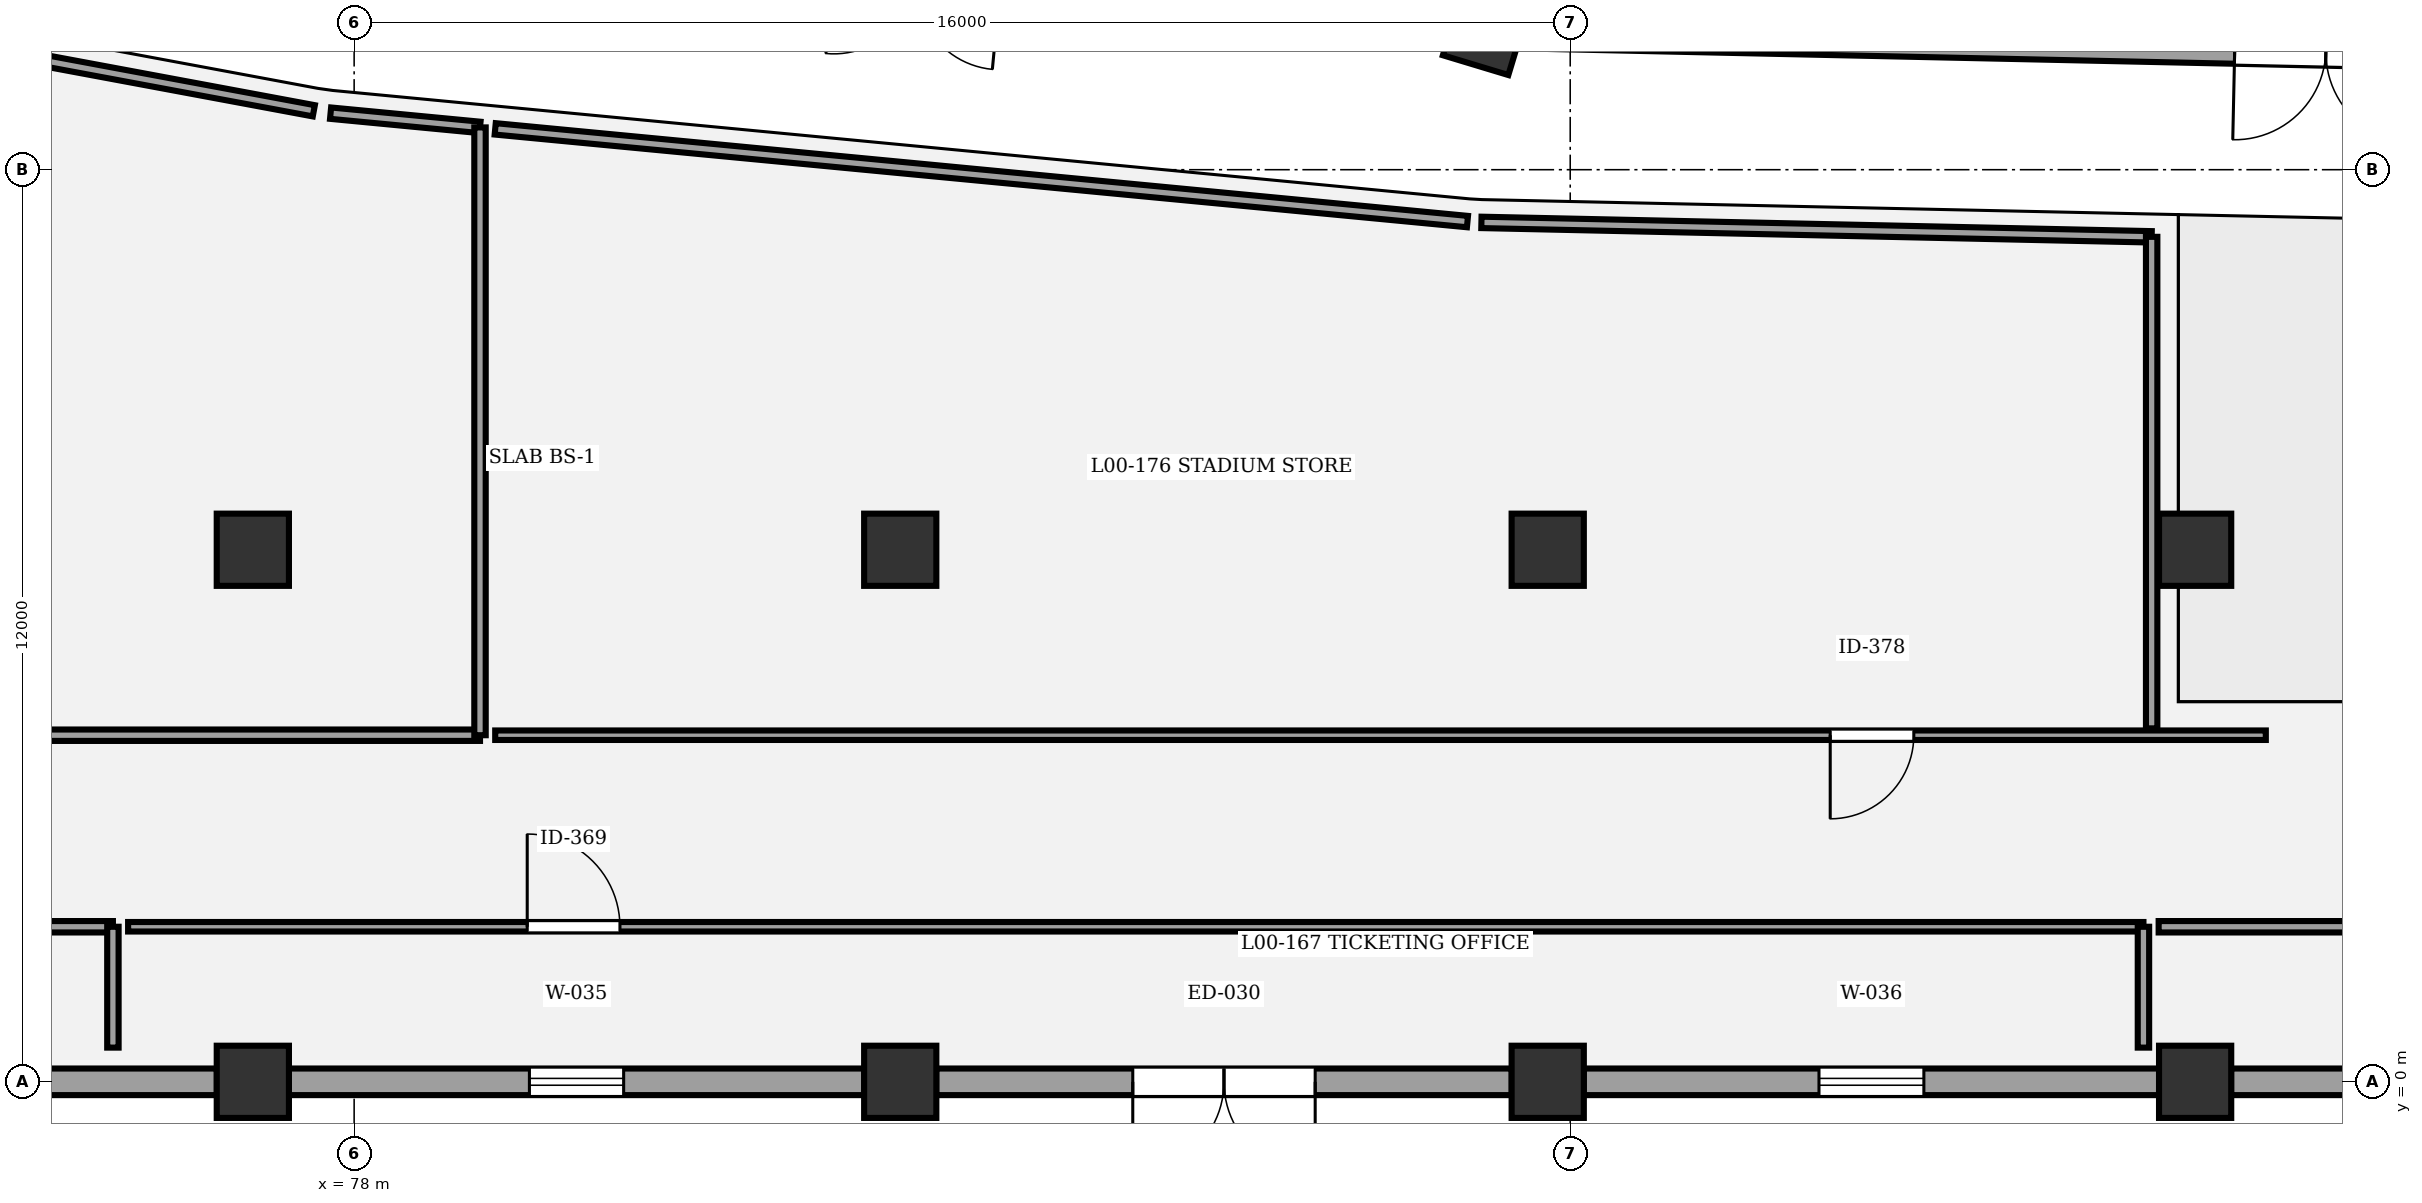
"""IFC4 building model, lengths in metres.
Left out: names, types, materials, properties, quantities, classifications, styles, units other than length and angle.
Written with IfcOpenShell. Run it as: python <this file> out.ifc"""

import sys

from ifc_helpers import new_model, si_unit, direction, frame, frame_2d, origin, origin_2d, place, context, subcontext, project, spatial, rectangle, circle, extrude, element, fill, save


model = new_model("IFC4")
c1 = context("Model", 3, precision=1e-05, world=origin(), true_north=direction((0.0, 1.0)))
c2 = subcontext(c1, "Body", "Model", "MODEL_VIEW")
j1 = project(units=[si_unit("LENGTHUNIT", "METRE"), si_unit("PLANEANGLEUNIT", "RADIAN")], contexts=[c1])
p1 = place(None, origin())
s1 = spatial("IfcSite", under=j1, at=p1, CompositionType="ELEMENT")
p2 = place(p1, origin())
s2 = spatial("IfcBuilding", under=s1, at=p2, CompositionType="ELEMENT")
p3 = place(p2, origin())
s3 = spatial("IfcBuildingStorey", under=s2, at=p3, CompositionType="ELEMENT", Elevation=0.0)
p4 = place(p3, frame((92.885, 13.806, 0.0), z_axis=(0.0, 0.0, 1.0), x_axis=(-0.289198876314, -0.957269037387, 0.0)))
e1 = element("IfcColumn", 1, at=p4, inside=s3, PredefinedType="COLUMN", context=c2, shape_type="SweptSolid", body=[
    extrude(rectangle(XDim=0.9, YDim=0.9, at=origin_2d()), origin(), (0.0, 0.0, 1.0), 5.4),
])
for number, where, z_axis, x_axis in (
    (2, (76.667, 0.0, 0.0), (0.0, 0.0, 1.0), (1.0, 0.0, 0.0)),
    (3, (76.667, 7.0, 0.0), (0.0, 0.0, 1.0), (1.0, 0.0, 0.0)),
    (4, (85.185, 0.0, 0.0), (0.0, 0.0, 1.0), (1.0, 0.0, 0.0)),
    (5, (85.185, 7.0, 0.0), (0.0, 0.0, 1.0), (1.0, 0.0, 0.0)),
    (6, (93.704, 0.0, 0.0), (0.0, 0.0, 1.0), (1.0, 0.0, 0.0)),
    (7, (93.704, 7.0, 0.0), (0.0, 0.0, 1.0), (1.0, 0.0, 0.0)),
    (8, (102.222, 0.0, 0.0), (0.0, 0.0, 1.0), (1.0, 0.0, 0.0)),
    (9, (102.222, 7.0, 0.0), (0.0, 0.0, 1.0), (1.0, 0.0, 0.0)),
):
    element("IfcColumn", number, at=place(p3, frame(where, z_axis=z_axis, x_axis=x_axis)), inside=s3, PredefinedType="COLUMN", context=c2, shape_type="SweptSolid", body=[
        extrude(circle(Radius=0.475, at=origin_2d()), origin(), (0.0, 0.0, 1.0), 5.4),
    ])
p5 = place(p3, frame((114.552, 13.34, 0.0), z_axis=(0.0, 0.0, 1.0), x_axis=(-0.999768115817, 0.021534033422, 0.0)))
e10 = element("IfcWall", 10, at=p5, inside=s3, PredefinedType="STANDARD", context=c2, shape_type="SweptSolid", body=[
    extrude(rectangle(XDim=21.224, YDim=0.4, at=frame_2d((10.612, 0.0))), origin(), (0.0, 0.0, 1.0), 4.25),
])
p6 = place(p5, frame((9.412, 0.0, 0.0)))
e11 = element("IfcOpeningElement", 11, at=p6, cuts=e10, PredefinedType="OPENING", context=c2, shape_type="SweptSolid", body=[
    extrude(rectangle(XDim=2.4, YDim=2.55, at=frame_2d((1.2, 1.275))), frame((0.0, 0.21, 0.0), z_axis=(0.0, -1.0, 0.0), x_axis=(1.0, 0.0, 0.0)), (0.0, 0.0, 1.0), 0.42),
])
p7 = place(p3, frame((76.194, 0.0, 0.0), z_axis=(0.0, 0.0, 1.0), x_axis=(-1.0, 0.0, 0.0)))
e12 = element("IfcWall", 12, at=p7, inside=s3, PredefinedType="STANDARD", context=c2, shape_type="SweptSolid", body=[
    extrude(rectangle(XDim=7.573, YDim=0.35, at=frame_2d((3.787, 0.0))), origin(), (0.0, 0.0, 1.0), 4.16),
])
p8 = place(p7, frame((2.687, 0.0, 0.0)))
e13 = element("IfcOpeningElement", 13, at=p8, cuts=e12, PredefinedType="OPENING", context=c2, shape_type="SweptSolid", body=[
    extrude(rectangle(XDim=2.2, YDim=2.5, at=frame_2d((1.1, 1.25))), frame((0.0, 0.185, 0.0), z_axis=(0.0, -1.0, 0.0), x_axis=(1.0, 0.0, 0.0)), (0.0, 0.0, 1.0), 0.37),
])
p9 = place(p3, frame((84.712, 0.0, 0.0), z_axis=(0.0, 0.0, 1.0), x_axis=(-1.0, 0.0, 0.0)))
e14 = element("IfcWall", 14, at=p9, inside=s3, PredefinedType="STANDARD", context=c2, shape_type="SweptSolid", body=[
    extrude(rectangle(XDim=7.572, YDim=0.35, at=frame_2d((3.786, 0.0))), origin(), (0.0, 0.0, 1.0), 4.16),
])
p10 = place(p9, frame((3.166, 0.0, 0.9)))
e15 = element("IfcOpeningElement", 15, at=p10, cuts=e14, PredefinedType="OPENING", context=c2, shape_type="SweptSolid", body=[
    extrude(rectangle(XDim=1.24, YDim=2.15, at=frame_2d((0.62, 1.075))), frame((0.0, 0.185, 0.0), z_axis=(0.0, -1.0, 0.0), x_axis=(1.0, 0.0, 0.0)), (0.0, 0.0, 1.0), 0.37),
])
p11 = place(p3, frame((93.231, 0.0, 0.0), z_axis=(0.0, 0.0, 1.0), x_axis=(-1.0, 0.0, 0.0)))
e16 = element("IfcWall", 16, at=p11, inside=s3, PredefinedType="STANDARD", context=c2, shape_type="SweptSolid", body=[
    extrude(rectangle(XDim=7.573, YDim=0.35, at=frame_2d((3.787, 0.0))), origin(), (0.0, 0.0, 1.0), 4.16),
])
p12 = place(p11, frame((2.586, 0.0, 0.0)))
e17 = element("IfcOpeningElement", 17, at=p12, cuts=e16, PredefinedType="OPENING", context=c2, shape_type="SweptSolid", body=[
    extrude(rectangle(XDim=2.4, YDim=2.55, at=frame_2d((1.2, 1.275))), frame((0.0, 0.185, 0.0), z_axis=(0.0, -1.0, 0.0), x_axis=(1.0, 0.0, 0.0)), (0.0, 0.0, 1.0), 0.37),
])
p13 = place(p3, frame((101.749, 0.0, 0.0), z_axis=(0.0, 0.0, 1.0), x_axis=(-1.0, 0.0, 0.0)))
e18 = element("IfcWall", 18, at=p13, inside=s3, PredefinedType="STANDARD", context=c2, shape_type="SweptSolid", body=[
    extrude(rectangle(XDim=7.572, YDim=0.35, at=frame_2d((3.786, 0.0))), origin(), (0.0, 0.0, 1.0), 4.16),
])
p14 = place(p13, frame((3.096, 0.0, 0.9)))
e19 = element("IfcOpeningElement", 19, at=p14, cuts=e18, PredefinedType="OPENING", context=c2, shape_type="SweptSolid", body=[
    extrude(rectangle(XDim=1.38, YDim=2.15, at=frame_2d((0.69, 1.075))), frame((0.0, 0.185, 0.0), z_axis=(0.0, -1.0, 0.0), x_axis=(1.0, 0.0, 0.0)), (0.0, 0.0, 1.0), 0.37),
])
p15 = place(p3, frame((110.268, 0.0, 0.0), z_axis=(0.0, 0.0, 1.0), x_axis=(-1.0, 0.0, 0.0)))
e20 = element("IfcWall", 20, at=p15, inside=s3, PredefinedType="STANDARD", context=c2, shape_type="SweptSolid", body=[
    extrude(rectangle(XDim=7.573, YDim=0.35, at=frame_2d((3.787, 0.0))), origin(), (0.0, 0.0, 1.0), 4.16),
])
p16 = place(p15, frame((2.987, 0.0, 0.0)))
e21 = element("IfcOpeningElement", 21, at=p16, cuts=e20, PredefinedType="OPENING", context=c2, shape_type="SweptSolid", body=[
    extrude(rectangle(XDim=1.6, YDim=2.3, at=frame_2d((0.8, 1.15))), frame((0.0, 0.185, 0.0), z_axis=(0.0, -1.0, 0.0), x_axis=(1.0, 0.0, 0.0)), (0.0, 0.0, 1.0), 0.37),
])
p17 = place(p3, frame((53.9, 2.04, 0.0), z_axis=(0.0, 0.0, 1.0), x_axis=(1.0, 0.0, 0.0)))
e22 = element("IfcWall", 22, at=p17, inside=s3, PredefinedType="PARTITIONING", context=c2, shape_type="SweptSolid", body=[
    extrude(rectangle(XDim=20.926, YDim=0.15, at=frame_2d((10.463, 0.0))), origin(), (0.0, 0.0, 1.0), 4.15),
])
p18 = place(p17, frame((1.275, 0.0, 0.0)))
e23 = element("IfcOpeningElement", 23, at=p18, cuts=e22, PredefinedType="OPENING", context=c2, shape_type="SweptSolid", body=[
    extrude(rectangle(XDim=1.18, YDim=2.1, at=frame_2d((0.59, 1.05))), frame((0.0, 0.085, 0.0), z_axis=(0.0, -1.0, 0.0), x_axis=(1.0, 0.0, 0.0)), (0.0, 0.0, 1.0), 0.17),
])
p19 = place(p3, frame((75.026, 2.04, 0.0), z_axis=(0.0, 0.0, 1.0), x_axis=(1.0, 0.0, 0.0)))
e24 = element("IfcWall", 24, at=p19, inside=s3, PredefinedType="PARTITIONING", context=c2, shape_type="SweptSolid", body=[
    extrude(rectangle(XDim=26.516, YDim=0.125, at=frame_2d((13.258, 0.0))), origin(), (0.0, 0.0, 1.0), 4.15),
])
p20 = place(p19, frame((5.251, 0.0, 0.0)))
e25 = element("IfcOpeningElement", 25, at=p20, cuts=e24, PredefinedType="OPENING", context=c2, shape_type="SweptSolid", body=[
    extrude(rectangle(XDim=1.22, YDim=2.1, at=frame_2d((0.61, 1.05))), frame((0.0, 0.073, 0.0), z_axis=(0.0, -1.0, 0.0), x_axis=(1.0, 0.0, 0.0)), (0.0, 0.0, 1.0), 0.145),
])
p21 = place(p3, frame((101.742, 2.04, 0.0), z_axis=(0.0, 0.0, 1.0), x_axis=(1.0, 0.0, 0.0)))
e26 = element("IfcWall", 26, at=p21, inside=s3, PredefinedType="PARTITIONING", context=c2, shape_type="SweptSolid", body=[
    extrude(rectangle(XDim=26.516, YDim=0.15, at=frame_2d((13.258, 0.0))), origin(), (0.0, 0.0, 1.0), 4.15),
])
p22 = place(p21, frame((12.628, 0.0, 0.0)))
e27 = element("IfcOpeningElement", 27, at=p22, cuts=e26, PredefinedType="OPENING", context=c2, shape_type="SweptSolid", body=[
    extrude(rectangle(XDim=1.26, YDim=2.1, at=frame_2d((0.63, 1.05))), frame((0.0, 0.085, 0.0), z_axis=(0.0, -1.0, 0.0), x_axis=(1.0, 0.0, 0.0)), (0.0, 0.0, 1.0), 0.17),
])
p23 = place(p3, frame((79.656, 4.56, 0.0), z_axis=(0.0, 0.0, 1.0), x_axis=(-1.0, 0.0, 0.0)))
e28 = element("IfcWall", 28, at=p23, inside=s3, PredefinedType="PARTITIONING", context=c2, shape_type="SweptSolid", body=[
    extrude(rectangle(XDim=23.296, YDim=0.15, at=frame_2d((11.648, 0.0))), origin(), (0.0, 0.0, 1.0), 4.15),
])
p24 = place(p23, frame((14.357, 0.0, 0.0)))
e29 = element("IfcOpeningElement", 29, at=p24, cuts=e28, PredefinedType="OPENING", context=c2, shape_type="SweptSolid", body=[
    extrude(rectangle(XDim=1.06, YDim=2.2, at=frame_2d((0.53, 1.1))), frame((0.0, 0.085, 0.0), z_axis=(0.0, -1.0, 0.0), x_axis=(1.0, 0.0, 0.0)), (0.0, 0.0, 1.0), 0.17),
])
p25 = place(p3, frame((103.152, 4.56, 0.0), z_axis=(0.0, 0.0, 1.0), x_axis=(-1.0, 0.0, 0.0)))
e30 = element("IfcWall", 30, at=p25, inside=s3, PredefinedType="PARTITIONING", context=c2, shape_type="SweptSolid", body=[
    extrude(rectangle(XDim=23.296, YDim=0.125, at=frame_2d((11.648, 0.0))), origin(), (0.0, 0.0, 1.0), 4.15),
])
p26 = place(p25, frame((4.631, 0.0, 0.0)))
e31 = element("IfcOpeningElement", 31, at=p26, cuts=e30, PredefinedType="OPENING", context=c2, shape_type="SweptSolid", body=[
    extrude(rectangle(XDim=1.1, YDim=2.2, at=frame_2d((0.55, 1.1))), frame((0.0, 0.073, 0.0), z_axis=(0.0, -1.0, 0.0), x_axis=(1.0, 0.0, 0.0)), (0.0, 0.0, 1.0), 0.145),
])
for number, where, z_axis, x_axis in (
    (32, (74.826, 2.04, 0.0), (0.0, 0.0, 1.0), (0.0, -1.0, 0.0)),
    (33, (101.542, 2.04, 0.0), (0.0, 0.0, 1.0), (0.0, -1.0, 0.0)),
):
    element("IfcWall", number, at=place(p3, frame(where, z_axis=z_axis, x_axis=x_axis)), inside=s3, PredefinedType="PARTITIONING", context=c2, shape_type="SweptSolid", body=[
        extrude(rectangle(XDim=1.59, YDim=0.15, at=frame_2d((0.795, 0.0))), origin(), (0.0, 0.0, 1.0), 4.15),
    ])
p27 = place(p3, frame((64.741, 15.146, 0.0), z_axis=(0.0, 0.0, 1.0), x_axis=(0.983094545276, -0.183098648406, 0.0)))
e34 = element("IfcWall", 34, at=p27, inside=s3, PredefinedType="PARTITIONING", context=c2, shape_type="SweptSolid", body=[
    extrude(rectangle(XDim=12.947, YDim=0.15, at=frame_2d((6.474, 0.0))), origin(), (0.0, 0.0, 1.0), 4.15),
])
p28 = place(p3, frame((77.69, 12.744, 0.0), z_axis=(0.0, 0.0, 1.0), x_axis=(0.995483241572, -0.094937430712, 0.0)))
e35 = element("IfcWall", 35, at=p28, inside=s3, PredefinedType="PARTITIONING", context=c2, shape_type="SweptSolid", body=[
    extrude(rectangle(XDim=1.975, YDim=0.15, at=frame_2d((0.988, 0.0))), origin(), (0.0, 0.0, 1.0), 4.15),
])
p29 = place(p3, frame((79.656, 12.556, 0.0), z_axis=(0.0, 0.0, 1.0), x_axis=(0.0, -1.0, 0.0)))
e36 = element("IfcWall", 36, at=p29, inside=s3, PredefinedType="PARTITIONING", context=c2, shape_type="SweptSolid", body=[
    extrude(rectangle(XDim=7.996, YDim=0.15, at=frame_2d((3.998, 0.0))), origin(), (0.0, 0.0, 1.0), 4.15),
])
p30 = place(p3, frame((92.832, 11.307, 0.0), z_axis=(0.0, 0.0, 1.0), x_axis=(0.999768109674, -0.021534318641, 0.0)))
e37 = element("IfcWall", 37, at=p30, inside=s3, PredefinedType="PARTITIONING", context=c2, shape_type="SweptSolid", body=[
    extrude(rectangle(XDim=8.82, YDim=0.15, at=frame_2d((4.41, 0.0))), origin(), (0.0, 0.0, 1.0), 4.15),
])
p31 = place(p3, frame((101.65, 11.117, 0.0), z_axis=(0.0, 0.0, 1.0), x_axis=(0.0, -1.0, 0.0)))
e38 = element("IfcWall", 38, at=p31, inside=s3, PredefinedType="PARTITIONING", context=c2, shape_type="SweptSolid", body=[
    extrude(rectangle(XDim=6.467, YDim=0.15, at=frame_2d((3.233, 0.0))), origin(), (0.0, 0.0, 1.0), 4.15),
])
p32 = place(p3, frame((79.856, 12.537, 0.0), z_axis=(0.0, 0.0, 1.0), x_axis=(0.995483253835, -0.094937302124, 0.0)))
e39 = element("IfcWall", 39, at=p32, inside=s3, PredefinedType="PARTITIONING", context=c2, shape_type="SweptSolid", body=[
    extrude(rectangle(XDim=12.85, YDim=0.15, at=frame_2d((6.425, 0.0))), origin(), (0.0, 0.0, 1.0), 4.15),
])
p33 = place(p6, origin())
e40 = element("IfcDoor", 40, at=p33, inside=s3, OperationType="DOUBLE_DOOR_SINGLE_SWING", PredefinedType="DOOR", context=c2, shape_type="SweptSolid", body=[
    extrude(rectangle(XDim=2.4, YDim=2.55, at=frame_2d((1.2, 1.275))), frame((0.0, 0.025, 0.0), z_axis=(0.0, -1.0, 0.0), x_axis=(1.0, 0.0, 0.0)), (0.0, 0.0, 1.0), 0.05),
])
fill(e11, e40)
p34 = place(p10, origin())
e41 = element("IfcWindow", 41, at=p34, inside=s3, PartitioningType="SINGLE_PANEL", PredefinedType="WINDOW", context=c2, shape_type="SweptSolid", body=[
    extrude(rectangle(XDim=1.24, YDim=2.15, at=frame_2d((0.62, 1.075))), frame((0.0, 0.03, 0.0), z_axis=(0.0, -1.0, 0.0), x_axis=(1.0, 0.0, 0.0)), (0.0, 0.0, 1.0), 0.06),
])
fill(e15, e41)
p35 = place(p12, origin())
e42 = element("IfcDoor", 42, at=p35, inside=s3, OperationType="DOUBLE_DOOR_SINGLE_SWING", PredefinedType="DOOR", context=c2, shape_type="SweptSolid", body=[
    extrude(rectangle(XDim=2.4, YDim=2.55, at=frame_2d((1.2, 1.275))), frame((0.0, 0.025, 0.0), z_axis=(0.0, -1.0, 0.0), x_axis=(1.0, 0.0, 0.0)), (0.0, 0.0, 1.0), 0.05),
])
fill(e17, e42)
p36 = place(p14, origin())
e43 = element("IfcWindow", 43, at=p36, inside=s3, PartitioningType="SINGLE_PANEL", PredefinedType="WINDOW", context=c2, shape_type="SweptSolid", body=[
    extrude(rectangle(XDim=1.38, YDim=2.15, at=frame_2d((0.69, 1.075))), frame((0.0, 0.03, 0.0), z_axis=(0.0, -1.0, 0.0), x_axis=(1.0, 0.0, 0.0)), (0.0, 0.0, 1.0), 0.06),
])
fill(e19, e43)
p37 = place(p20, origin())
e44 = element("IfcDoor", 44, at=p37, inside=s3, OperationType="SINGLE_SWING_LEFT", PredefinedType="DOOR", context=c2, shape_type="SweptSolid", body=[
    extrude(rectangle(XDim=1.22, YDim=2.1, at=frame_2d((0.61, 1.05))), frame((0.0, 0.025, 0.0), z_axis=(0.0, -1.0, 0.0), x_axis=(1.0, 0.0, 0.0)), (0.0, 0.0, 1.0), 0.05),
])
fill(e25, e44)
p38 = place(p26, origin())
e45 = element("IfcDoor", 45, at=p38, inside=s3, OperationType="SINGLE_SWING_RIGHT", PredefinedType="DOOR", context=c2, shape_type="SweptSolid", body=[
    extrude(rectangle(XDim=1.1, YDim=2.2, at=frame_2d((0.55, 1.1))), frame((0.0, 0.025, 0.0), z_axis=(0.0, -1.0, 0.0), x_axis=(1.0, 0.0, 0.0)), (0.0, 0.0, 1.0), 0.05),
])
fill(e31, e45)
save(model, sys.argv[1])
